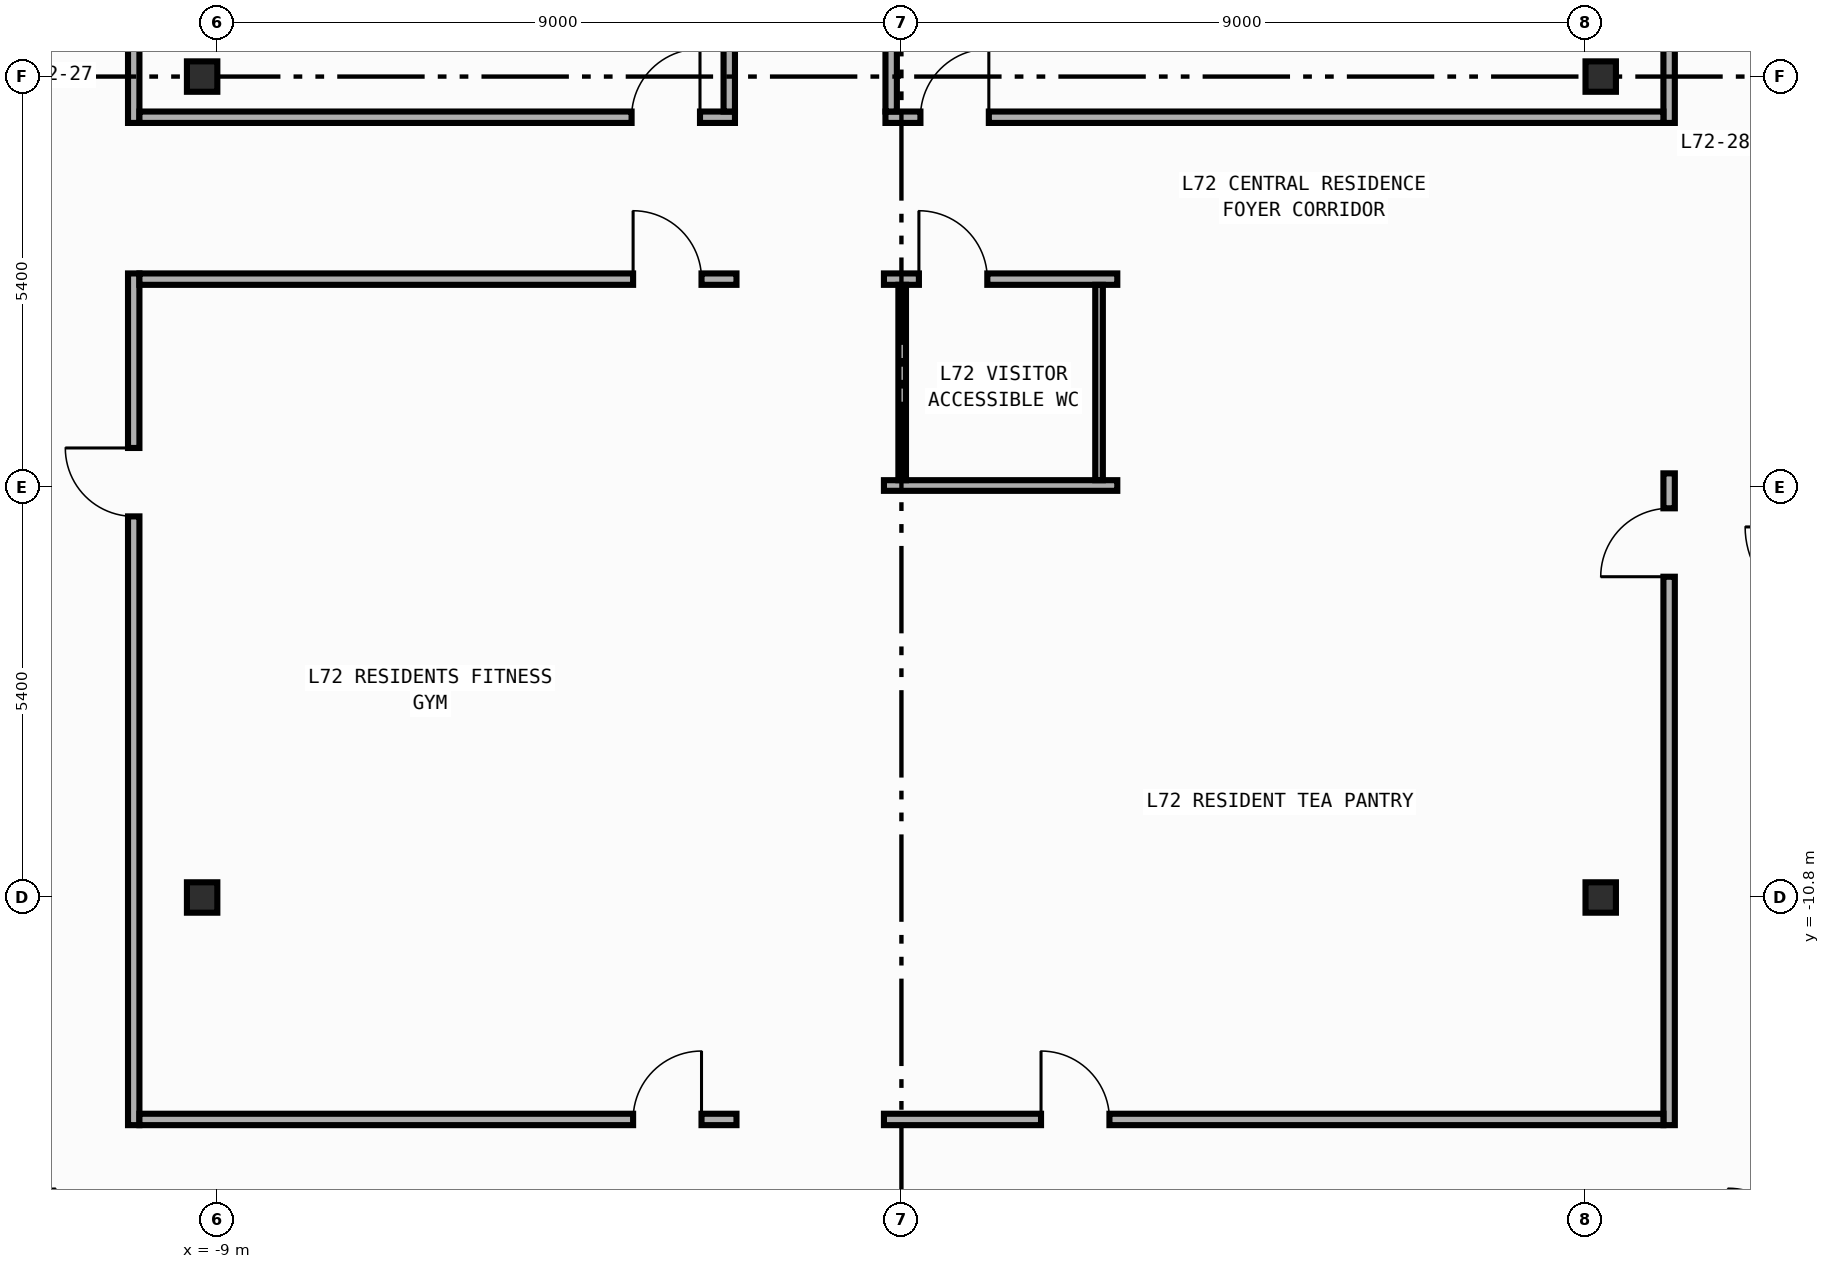
"""IFC4 building model, lengths in metres.
Left out: names, types, materials, properties, quantities, classifications, styles, units other than length and angle.
Written with IfcOpenShell. Run it as: python <this file> out.ifc"""

import sys

from ifc_helpers import new_model, si_unit, direction, frame, frame_2d, origin, origin_2d, place, context, subcontext, project, spatial, rectangle, i_section, extrude, element, fill, save


model = new_model("IFC4")
c1 = context("Model", 3, precision=1e-05, world=origin(), true_north=direction((0.0, 1.0)))
c2 = subcontext(c1, "Body", "Model", "MODEL_VIEW")
j1 = project(units=[si_unit("LENGTHUNIT", "METRE"), si_unit("PLANEANGLEUNIT", "RADIAN")], contexts=[c1])
p1 = place(None, origin())
s1 = spatial("IfcSite", under=j1, at=p1, CompositionType="ELEMENT")
p2 = place(p1, origin())
s2 = spatial("IfcBuilding", under=s1, at=p2, CompositionType="ELEMENT")
p3 = place(p2, frame((0.0, 0.0, 300.4)))
s3 = spatial("IfcBuildingStorey", under=s2, at=p3, CompositionType="ELEMENT", Elevation=300.4)
for number, where, z_axis, x_axis in (
    (1, (-9.2, -10.8, 0.0), (0.0, 0.0, 1.0), (1.0, 0.0, 0.0)),
    (2, (-9.2, 0.0, 0.0), (0.0, 0.0, 1.0), (1.0, 0.0, 0.0)),
    (3, (9.2, -10.8, 0.0), (0.0, 0.0, 1.0), (1.0, 0.0, 0.0)),
    (4, (9.2, 0.0, 0.0), (0.0, 0.0, 1.0), (1.0, 0.0, 0.0)),
):
    element("IfcColumn", number, at=place(p3, frame(where, z_axis=z_axis, x_axis=x_axis)), inside=s3, PredefinedType="COLUMN", context=c2, shape_type="SweptSolid", body=[
        extrude(i_section(OverallWidth=0.4, OverallDepth=0.4, WebThickness=0.013, FlangeThickness=0.021, FilletRadius=0.022, at=origin_2d()), origin(), (0.0, 0.0, 1.0), 3.8),
    ])
p4 = place(p3, frame((-10.1, -0.61, 0.0), z_axis=(0.0, 0.0, 1.0), x_axis=(0.0, 1.0, 0.0)))
e5 = element("IfcWall", 5, at=p4, inside=s3, PredefinedType="PARTITIONING", context=c2, shape_type="SweptSolid", body=[
    extrude(rectangle(XDim=14.405, YDim=0.15, at=frame_2d((7.203, 0.0))), origin(), (0.0, 0.0, 1.0), 3.54),
])
p5 = place(p4, frame((5.535, 0.0, 0.0)))
e6 = element("IfcOpeningElement", 6, at=p5, cuts=e5, PredefinedType="OPENING", context=c2, shape_type="SweptSolid", body=[
    extrude(rectangle(XDim=0.9, YDim=2.15, at=frame_2d((0.45, 1.075))), frame((0.0, 0.085, 0.0), z_axis=(0.0, -1.0, 0.0), x_axis=(1.0, 0.0, 0.0)), (0.0, 0.0, 1.0), 0.17),
])
p6 = place(p3, frame((-10.1, -13.795, 0.0), z_axis=(0.0, 0.0, 1.0), x_axis=(0.0, 1.0, 0.0)))
e7 = element("IfcWall", 7, at=p6, inside=s3, PredefinedType="PARTITIONING", context=c2, shape_type="SweptSolid", body=[
    extrude(rectangle(XDim=11.205, YDim=0.15, at=frame_2d((5.603, 0.0))), origin(), (0.0, 0.0, 1.0), 3.54),
])
p7 = place(p6, frame((8.009, 0.0, 0.0)))
e8 = element("IfcOpeningElement", 8, at=p7, cuts=e7, PredefinedType="OPENING", context=c2, shape_type="SweptSolid", body=[
    extrude(rectangle(XDim=0.9, YDim=2.15, at=frame_2d((0.45, 1.075))), frame((0.0, 0.085, 0.0), z_axis=(0.0, -1.0, 0.0), x_axis=(1.0, 0.0, 0.0)), (0.0, 0.0, 1.0), 0.17),
])
p8 = place(p3, frame((10.1, -0.61, 0.0), z_axis=(0.0, 0.0, 1.0), x_axis=(0.0, 1.0, 0.0)))
e9 = element("IfcWall", 9, at=p8, inside=s3, PredefinedType="PARTITIONING", context=c2, shape_type="SweptSolid", body=[
    extrude(rectangle(XDim=14.49, YDim=0.15, at=frame_2d((7.245, 0.0))), origin(), (0.0, 0.0, 1.0), 3.54),
])
p9 = place(p8, frame((5.488, 0.0, 0.0)))
e10 = element("IfcOpeningElement", 10, at=p9, cuts=e9, PredefinedType="OPENING", context=c2, shape_type="SweptSolid", body=[
    extrude(rectangle(XDim=0.9, YDim=2.15, at=frame_2d((0.45, 1.075))), frame((0.0, 0.085, 0.0), z_axis=(0.0, -1.0, 0.0), x_axis=(1.0, 0.0, 0.0)), (0.0, 0.0, 1.0), 0.17),
])
p10 = place(p3, frame((10.1, -13.795, 0.0), z_axis=(0.0, 0.0, 1.0), x_axis=(0.0, 1.0, 0.0)))
e11 = element("IfcWall", 11, at=p10, inside=s3, PredefinedType="PARTITIONING", context=c2, shape_type="SweptSolid", body=[
    extrude(rectangle(XDim=8.575, YDim=0.15, at=frame_2d((4.288, 0.0))), origin(), (0.0, 0.0, 1.0), 3.54),
])
p11 = place(p10, frame((7.215, 0.0, 0.0)))
e12 = element("IfcOpeningElement", 12, at=p11, cuts=e11, PredefinedType="OPENING", context=c2, shape_type="SweptSolid", body=[
    extrude(rectangle(XDim=0.9, YDim=2.15, at=frame_2d((0.45, 1.075))), frame((0.0, 0.085, 0.0), z_axis=(0.0, -1.0, 0.0), x_axis=(1.0, 0.0, 0.0)), (0.0, 0.0, 1.0), 0.17),
])
p12 = place(p3, frame((-10.025, -0.535, 0.0), z_axis=(0.0, 0.0, 1.0), x_axis=(1.0, 0.0, 0.0)))
e13 = element("IfcWall", 13, at=p12, inside=s3, PredefinedType="PARTITIONING", context=c2, shape_type="SweptSolid", body=[
    extrude(rectangle(XDim=7.835, YDim=0.15, at=frame_2d((3.917, 0.0))), origin(), (0.0, 0.0, 1.0), 3.54),
])
p13 = place(p12, frame((6.475, 0.0, 0.0)))
e14 = element("IfcOpeningElement", 14, at=p13, cuts=e13, PredefinedType="OPENING", context=c2, shape_type="SweptSolid", body=[
    extrude(rectangle(XDim=0.9, YDim=2.15, at=frame_2d((0.45, 1.075))), frame((0.0, 0.085, 0.0), z_axis=(0.0, -1.0, 0.0), x_axis=(1.0, 0.0, 0.0)), (0.0, 0.0, 1.0), 0.17),
])
p14 = place(p3, frame((-10.025, -2.665, 0.0), z_axis=(0.0, 0.0, 1.0), x_axis=(1.0, 0.0, 0.0)))
e15 = element("IfcWall", 15, at=p14, inside=s3, PredefinedType="PARTITIONING", context=c2, shape_type="SweptSolid", body=[
    extrude(rectangle(XDim=7.855, YDim=0.15, at=frame_2d((3.927, 0.0))), origin(), (0.0, 0.0, 1.0), 3.54),
])
p15 = place(p14, frame((6.495, 0.0, 0.0)))
e16 = element("IfcOpeningElement", 16, at=p15, cuts=e15, PredefinedType="OPENING", context=c2, shape_type="SweptSolid", body=[
    extrude(rectangle(XDim=0.9, YDim=2.15, at=frame_2d((0.45, 1.075))), frame((0.0, 0.085, 0.0), z_axis=(0.0, -1.0, 0.0), x_axis=(1.0, 0.0, 0.0)), (0.0, 0.0, 1.0), 0.17),
])
p16 = place(p3, frame((-0.21, -0.535, 0.0), z_axis=(0.0, 0.0, 1.0), x_axis=(1.0, 0.0, 0.0)))
e17 = element("IfcWall", 17, at=p16, inside=s3, PredefinedType="PARTITIONING", context=c2, shape_type="SweptSolid", body=[
    extrude(rectangle(XDim=10.235, YDim=0.15, at=frame_2d((5.117, 0.0))), origin(), (0.0, 0.0, 1.0), 3.54),
])
p17 = place(p16, frame((0.46, 0.0, 0.0)))
e18 = element("IfcOpeningElement", 18, at=p17, cuts=e17, PredefinedType="OPENING", context=c2, shape_type="SweptSolid", body=[
    extrude(rectangle(XDim=0.9, YDim=2.15, at=frame_2d((0.45, 1.075))), frame((0.0, 0.085, 0.0), z_axis=(0.0, -1.0, 0.0), x_axis=(1.0, 0.0, 0.0)), (0.0, 0.0, 1.0), 0.17),
])
p18 = place(p3, frame((-0.23, -2.665, 0.0), z_axis=(0.0, 0.0, 1.0), x_axis=(1.0, 0.0, 0.0)))
e19 = element("IfcWall", 19, at=p18, inside=s3, PredefinedType="PARTITIONING", context=c2, shape_type="SweptSolid", body=[
    extrude(rectangle(XDim=3.07, YDim=0.15, at=frame_2d((1.535, 0.0))), origin(), (0.0, 0.0, 1.0), 3.54),
])
p19 = place(p18, frame((0.46, 0.0, 0.0)))
e20 = element("IfcOpeningElement", 20, at=p19, cuts=e19, PredefinedType="OPENING", context=c2, shape_type="SweptSolid", body=[
    extrude(rectangle(XDim=0.9, YDim=2.15, at=frame_2d((0.45, 1.075))), frame((0.0, 0.085, 0.0), z_axis=(0.0, -1.0, 0.0), x_axis=(1.0, 0.0, 0.0)), (0.0, 0.0, 1.0), 0.17),
])
p20 = place(p3, frame((-2.265, -0.46, 0.0), z_axis=(0.0, 0.0, 1.0), x_axis=(0.0, 1.0, 0.0)))
e21 = element("IfcWall", 21, at=p20, inside=s3, PredefinedType="PARTITIONING", context=c2, shape_type="SweptSolid", body=[
    extrude(rectangle(XDim=14.255, YDim=0.15, at=frame_2d((7.127, 0.0))), origin(), (0.0, 0.0, 1.0), 3.54),
])
p21 = place(p20, frame((5.474, 0.0, 0.0)))
e22 = element("IfcOpeningElement", 22, at=p21, cuts=e21, PredefinedType="OPENING", context=c2, shape_type="SweptSolid", body=[
    extrude(rectangle(XDim=0.9, YDim=2.15, at=frame_2d((0.45, 1.075))), frame((0.0, 0.085, 0.0), z_axis=(0.0, -1.0, 0.0), x_axis=(1.0, 0.0, 0.0)), (0.0, 0.0, 1.0), 0.17),
])
p22 = place(p3, frame((-0.135, -0.46, 0.0), z_axis=(0.0, 0.0, 1.0), x_axis=(0.0, 1.0, 0.0)))
e23 = element("IfcWall", 23, at=p22, inside=s3, PredefinedType="PARTITIONING", context=c2, shape_type="SweptSolid", body=[
    extrude(rectangle(XDim=14.255, YDim=0.15, at=frame_2d((7.127, 0.0))), origin(), (0.0, 0.0, 1.0), 3.54),
])
p23 = place(p22, frame((5.474, 0.0, 0.0)))
e24 = element("IfcOpeningElement", 24, at=p23, cuts=e23, PredefinedType="OPENING", context=c2, shape_type="SweptSolid", body=[
    extrude(rectangle(XDim=0.9, YDim=2.15, at=frame_2d((0.45, 1.075))), frame((0.0, 0.085, 0.0), z_axis=(0.0, -1.0, 0.0), x_axis=(1.0, 0.0, 0.0)), (0.0, 0.0, 1.0), 0.17),
])
p24 = place(p3, frame((-10.025, -13.72, 0.0), z_axis=(0.0, 0.0, 1.0), x_axis=(1.0, 0.0, 0.0)))
e25 = element("IfcWall", 25, at=p24, inside=s3, PredefinedType="PARTITIONING", context=c2, shape_type="SweptSolid", body=[
    extrude(rectangle(XDim=7.855, YDim=0.15, at=frame_2d((3.927, 0.0))), origin(), (0.0, 0.0, 1.0), 3.54),
])
p25 = place(p24, frame((6.495, 0.0, 0.0)))
e26 = element("IfcOpeningElement", 26, at=p25, cuts=e25, PredefinedType="OPENING", context=c2, shape_type="SweptSolid", body=[
    extrude(rectangle(XDim=0.9, YDim=2.15, at=frame_2d((0.45, 1.075))), frame((0.0, 0.085, 0.0), z_axis=(0.0, -1.0, 0.0), x_axis=(1.0, 0.0, 0.0)), (0.0, 0.0, 1.0), 0.17),
])
p26 = place(p3, frame((-0.23, -13.72, 0.0), z_axis=(0.0, 0.0, 1.0), x_axis=(1.0, 0.0, 0.0)))
e27 = element("IfcWall", 27, at=p26, inside=s3, PredefinedType="PARTITIONING", context=c2, shape_type="SweptSolid", body=[
    extrude(rectangle(XDim=10.255, YDim=0.15, at=frame_2d((5.127, 0.0))), origin(), (0.0, 0.0, 1.0), 3.54),
])
p27 = place(p26, frame((2.067, 0.0, 0.0)))
e28 = element("IfcOpeningElement", 28, at=p27, cuts=e27, PredefinedType="OPENING", context=c2, shape_type="SweptSolid", body=[
    extrude(rectangle(XDim=0.9, YDim=2.15, at=frame_2d((0.45, 1.075))), frame((0.0, 0.085, 0.0), z_axis=(0.0, -1.0, 0.0), x_axis=(1.0, 0.0, 0.0)), (0.0, 0.0, 1.0), 0.17),
])
p28 = place(p3, frame((-0.23, -5.38, 0.0), z_axis=(0.0, 0.0, 1.0), x_axis=(1.0, 0.0, 0.0)))
e29 = element("IfcWall", 29, at=p28, inside=s3, PredefinedType="PARTITIONING", context=c2, shape_type="SweptSolid", body=[
    extrude(rectangle(XDim=3.07, YDim=0.14, at=frame_2d((1.535, 0.0))), origin(), (0.0, 0.0, 1.0), 3.54),
])
for number, where, z_axis, x_axis in (
    (30, (2.6, -2.74, 0.0), (0.0, 0.0, 1.0), (0.0, -1.0, 0.0)),
    (31, (0.01, -5.31, 0.0), (0.0, 0.0, 1.0), (0.0, 1.0, 0.0)),
):
    element("IfcWall", number, at=place(p3, frame(where, z_axis=z_axis, x_axis=x_axis)), inside=s3, PredefinedType="PARTITIONING", context=c2, shape_type="SweptSolid", body=[
        extrude(rectangle(XDim=2.57, YDim=0.1, at=frame_2d((1.285, 0.0))), origin(), (0.0, 0.0, 1.0), 3.54),
    ])
p29 = place(p7, origin())
e32 = element("IfcDoor", 32, at=p29, inside=s3, OperationType="SINGLE_SWING_RIGHT", PredefinedType="DOOR", context=c2, shape_type="SweptSolid", body=[
    extrude(rectangle(XDim=0.9, YDim=2.15, at=frame_2d((0.45, 1.075))), frame((0.0, 0.025, 0.0), z_axis=(0.0, -1.0, 0.0), x_axis=(1.0, 0.0, 0.0)), (0.0, 0.0, 1.0), 0.05),
])
fill(e8, e32)
p30 = place(p11, origin())
e33 = element("IfcDoor", 33, at=p30, inside=s3, OperationType="SINGLE_SWING_LEFT", PredefinedType="DOOR", context=c2, shape_type="SweptSolid", body=[
    extrude(rectangle(XDim=0.9, YDim=2.15, at=frame_2d((0.45, 1.075))), frame((0.0, 0.025, 0.0), z_axis=(0.0, -1.0, 0.0), x_axis=(1.0, 0.0, 0.0)), (0.0, 0.0, 1.0), 0.05),
])
fill(e12, e33)
p31 = place(p13, origin())
e34 = element("IfcDoor", 34, at=p31, inside=s3, OperationType="SINGLE_SWING_RIGHT", PredefinedType="DOOR", context=c2, shape_type="SweptSolid", body=[
    extrude(rectangle(XDim=0.9, YDim=2.15, at=frame_2d((0.45, 1.075))), frame((0.0, 0.025, 0.0), z_axis=(0.0, -1.0, 0.0), x_axis=(1.0, 0.0, 0.0)), (0.0, 0.0, 1.0), 0.05),
])
fill(e14, e34)
p32 = place(p15, origin())
e35 = element("IfcDoor", 35, at=p32, inside=s3, OperationType="SINGLE_SWING_LEFT", PredefinedType="DOOR", context=c2, shape_type="SweptSolid", body=[
    extrude(rectangle(XDim=0.9, YDim=2.15, at=frame_2d((0.45, 1.075))), frame((0.0, 0.025, 0.0), z_axis=(0.0, -1.0, 0.0), x_axis=(1.0, 0.0, 0.0)), (0.0, 0.0, 1.0), 0.05),
])
fill(e16, e35)
p33 = place(p17, origin())
e36 = element("IfcDoor", 36, at=p33, inside=s3, OperationType="SINGLE_SWING_RIGHT", PredefinedType="DOOR", context=c2, shape_type="SweptSolid", body=[
    extrude(rectangle(XDim=0.9, YDim=2.15, at=frame_2d((0.45, 1.075))), frame((0.0, 0.025, 0.0), z_axis=(0.0, -1.0, 0.0), x_axis=(1.0, 0.0, 0.0)), (0.0, 0.0, 1.0), 0.05),
])
fill(e18, e36)
p34 = place(p19, origin())
e37 = element("IfcDoor", 37, at=p34, inside=s3, OperationType="SINGLE_SWING_LEFT", PredefinedType="DOOR", context=c2, shape_type="SweptSolid", body=[
    extrude(rectangle(XDim=0.9, YDim=2.15, at=frame_2d((0.45, 1.075))), frame((0.0, 0.025, 0.0), z_axis=(0.0, -1.0, 0.0), x_axis=(1.0, 0.0, 0.0)), (0.0, 0.0, 1.0), 0.05),
])
fill(e20, e37)
p35 = place(p25, origin())
e38 = element("IfcDoor", 38, at=p35, inside=s3, OperationType="SINGLE_SWING_RIGHT", PredefinedType="DOOR", context=c2, shape_type="SweptSolid", body=[
    extrude(rectangle(XDim=0.9, YDim=2.15, at=frame_2d((0.45, 1.075))), frame((0.0, 0.025, 0.0), z_axis=(0.0, -1.0, 0.0), x_axis=(1.0, 0.0, 0.0)), (0.0, 0.0, 1.0), 0.05),
])
fill(e26, e38)
p36 = place(p27, origin())
e39 = element("IfcDoor", 39, at=p36, inside=s3, OperationType="SINGLE_SWING_LEFT", PredefinedType="DOOR", context=c2, shape_type="SweptSolid", body=[
    extrude(rectangle(XDim=0.9, YDim=2.15, at=frame_2d((0.45, 1.075))), frame((0.0, 0.025, 0.0), z_axis=(0.0, -1.0, 0.0), x_axis=(1.0, 0.0, 0.0)), (0.0, 0.0, 1.0), 0.05),
])
fill(e28, e39)
save(model, sys.argv[1])
